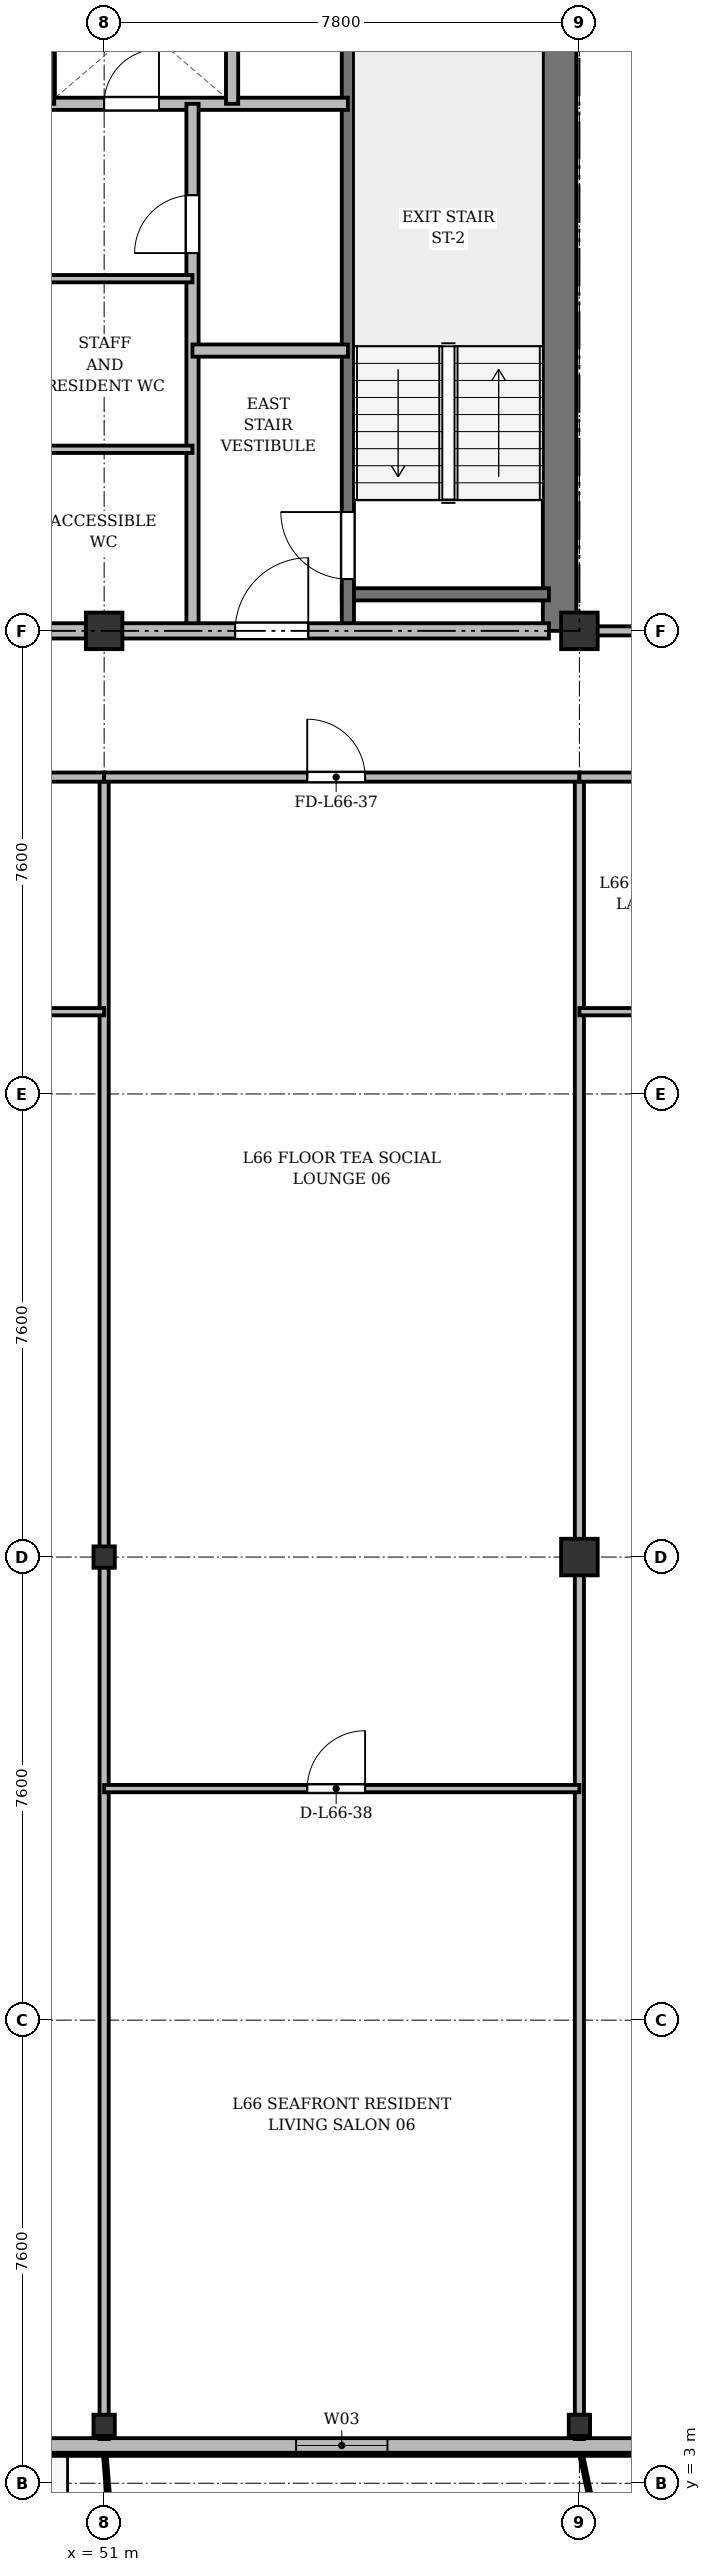
"""IFC4 building model, lengths in metres.
Left out: names, types, materials, properties, quantities, classifications, styles, units other than length and angle.
Written with IfcOpenShell. Run it as: python <this file> out.ifc"""

import sys

from ifc_helpers import new_model, si_unit, direction, frame, frame_2d, origin, origin_2d, place, context, subcontext, project, spatial, rectangle, i_section, extrude, source, transform, mapped, element, fill, save


model = new_model("IFC4")
c1 = context("Model", 3, precision=1e-05, world=origin(), true_north=direction((0.0, 1.0)))
c2 = subcontext(c1, "Body", "Model", "MODEL_VIEW")
j1 = project(units=[si_unit("LENGTHUNIT", "METRE"), si_unit("PLANEANGLEUNIT", "RADIAN")], contexts=[c1])
p1 = place(None, origin())
s1 = spatial("IfcSite", under=j1, at=p1, CompositionType="ELEMENT")
p2 = place(p1, origin())
s2 = spatial("IfcBuilding", under=s1, at=p2, CompositionType="ELEMENT")
p3 = place(p2, frame((0.0, 0.0, 255.9)))
s3 = spatial("IfcBuildingStorey", under=s2, at=p3, CompositionType="ELEMENT", Elevation=255.9)
m1 = source(origin(), c2, "Body", "SweptSolid", [
    extrude(i_section(OverallWidth=0.35, OverallDepth=0.35, WebThickness=0.018, FlangeThickness=0.028, at=origin_2d()), origin(), (0.0, 0.0, 1.0), 3.6),
])
for number, where, z_axis, x_axis in (
    (1, (51.0, 3.95, 0.0), (0.0, 0.0, 1.0), (1.0, 0.0, 0.0)),
    (2, (51.0, 18.2, 0.0), (0.0, 0.0, 1.0), (1.0, 0.0, 0.0)),
):
    element("IfcColumn", number, at=place(p3, frame(where, z_axis=z_axis, x_axis=x_axis)), inside=s3, PredefinedType="COLUMN", context=c2, shape_type="MappedRepresentation", body=[
        mapped(m1, transform((0.0, 0.0, 0.0), x_axis=(1.0, 0.0, 0.0), y_axis=(0.0, 1.0, 0.0), z_axis=(0.0, 0.0, 1.0), scale=1.0)),
    ])
m2 = source(origin(), c2, "Body", "SweptSolid", [
    extrude(rectangle(XDim=0.6, YDim=0.6, at=origin_2d()), origin(), (0.0, 0.0, 1.0), 3.6),
])
p4 = place(p3, frame((51.0, 33.4, 0.0), z_axis=(0.0, 0.0, 1.0), x_axis=(1.0, 0.0, 0.0)))
e3 = element("IfcColumn", 3, at=p4, inside=s3, PredefinedType="COLUMN", context=c2, shape_type="MappedRepresentation", body=[
    mapped(m2, transform((0.0, 0.0, 0.0), x_axis=(1.0, 0.0, 0.0), y_axis=(0.0, 1.0, 0.0), z_axis=(0.0, 0.0, 1.0), scale=1.0)),
])
p5 = place(p3, frame((58.8, 3.95, 0.0), z_axis=(0.0, 0.0, 1.0), x_axis=(1.0, 0.0, 0.0)))
e4 = element("IfcColumn", 4, at=p5, inside=s3, PredefinedType="COLUMN", context=c2, shape_type="MappedRepresentation", body=[
    mapped(m1, transform((0.0, 0.0, 0.0), x_axis=(1.0, 0.0, 0.0), y_axis=(0.0, 1.0, 0.0), z_axis=(0.0, 0.0, 1.0), scale=1.0)),
])
for number, where, z_axis, x_axis in (
    (5, (58.8, 18.2, 0.0), (0.0, 0.0, 1.0), (1.0, 0.0, 0.0)),
    (6, (58.8, 33.4, 0.0), (0.0, 0.0, 1.0), (1.0, 0.0, 0.0)),
):
    element("IfcColumn", number, at=place(p3, frame(where, z_axis=z_axis, x_axis=x_axis)), inside=s3, PredefinedType="COLUMN", context=c2, shape_type="MappedRepresentation", body=[
        mapped(m2, transform((0.0, 0.0, 0.0), x_axis=(1.0, 0.0, 0.0), y_axis=(0.0, 1.0, 0.0), z_axis=(0.0, 0.0, 1.0), scale=1.0)),
    ])
p6 = place(p3, frame((63.2, 3.62, 0.0), z_axis=(0.0, 0.0, 1.0), x_axis=(-1.0, 0.0, 0.0)))
e7 = element("IfcWall", 7, at=p6, inside=s3, PredefinedType="SOLIDWALL", context=c2, shape_type="SweptSolid", body=[
    extrude(rectangle(XDim=52.0, YDim=0.24, at=frame_2d((26.0, 0.0))), origin(), (0.0, 0.0, 1.0), 3.37),
])
p7 = place(p6, frame((1.145, 0.0, 0.9)))
e8 = element("IfcOpeningElement", 8, at=p7, cuts=e7, PredefinedType="OPENING", context=c2, shape_type="SweptSolid", body=[
    extrude(rectangle(XDim=2.2, YDim=1.8, at=frame_2d((1.1, 0.9))), frame((0.0, 0.13, 0.0), z_axis=(0.0, -1.0, 0.0), x_axis=(1.0, 0.0, 0.0)), (0.0, 0.0, 1.0), 0.26),
])
p8 = place(p6, frame((7.55, 0.0, 0.9)))
e9 = element("IfcOpeningElement", 9, at=p8, cuts=e7, PredefinedType="OPENING", context=c2, shape_type="SweptSolid", body=[
    extrude(rectangle(XDim=1.5, YDim=1.75, at=frame_2d((0.75, 0.875))), frame((0.0, 0.13, 0.0), z_axis=(0.0, -1.0, 0.0), x_axis=(1.0, 0.0, 0.0)), (0.0, 0.0, 1.0), 0.26),
])
p9 = place(p6, frame((14.017, 0.0, 0.0)))
e10 = element("IfcOpeningElement", 10, at=p9, cuts=e7, PredefinedType="OPENING", context=c2, shape_type="SweptSolid", body=[
    extrude(rectangle(XDim=1.2, YDim=2.2, at=frame_2d((0.6, 1.1))), frame((0.0, 0.13, 0.0), z_axis=(0.0, -1.0, 0.0), x_axis=(1.0, 0.0, 0.0)), (0.0, 0.0, 1.0), 0.26),
])
p10 = place(p6, frame((25.175, 0.0, 0.9)))
e11 = element("IfcOpeningElement", 11, at=p10, cuts=e7, PredefinedType="OPENING", context=c2, shape_type="SweptSolid", body=[
    extrude(rectangle(XDim=1.65, YDim=1.85, at=frame_2d((0.825, 0.925))), frame((0.0, 0.13, 0.0), z_axis=(0.0, -1.0, 0.0), x_axis=(1.0, 0.0, 0.0)), (0.0, 0.0, 1.0), 0.26),
])
p11 = place(p6, frame((35.3, 0.0, 0.9)))
e12 = element("IfcOpeningElement", 12, at=p11, cuts=e7, PredefinedType="OPENING", context=c2, shape_type="SweptSolid", body=[
    extrude(rectangle(XDim=1.8, YDim=1.8, at=frame_2d((0.9, 0.9))), frame((0.0, 0.13, 0.0), z_axis=(0.0, -1.0, 0.0), x_axis=(1.0, 0.0, 0.0)), (0.0, 0.0, 1.0), 0.26),
])
p12 = place(p6, frame((45.302, 0.0, 0.0)))
e13 = element("IfcOpeningElement", 13, at=p12, cuts=e7, PredefinedType="OPENING", context=c2, shape_type="SweptSolid", body=[
    extrude(rectangle(XDim=1.2, YDim=2.2, at=frame_2d((0.6, 1.1))), frame((0.0, 0.13, 0.0), z_axis=(0.0, -1.0, 0.0), x_axis=(1.0, 0.0, 0.0)), (0.0, 0.0, 1.0), 0.26),
])
p13 = place(p6, frame((49.005, 0.0, 0.9)))
e14 = element("IfcOpeningElement", 14, at=p13, cuts=e7, PredefinedType="OPENING", context=c2, shape_type="SweptSolid", body=[
    extrude(rectangle(XDim=1.5, YDim=1.75, at=frame_2d((0.75, 0.875))), frame((0.0, 0.13, 0.0), z_axis=(0.0, -1.0, 0.0), x_axis=(1.0, 0.0, 0.0)), (0.0, 0.0, 1.0), 0.26),
])
p14 = place(p3, frame((58.475, 33.4, 0.0), z_axis=(0.0, 0.0, 1.0), x_axis=(0.0, 1.0, 0.0)))
e15 = element("IfcWall", 15, at=p14, inside=s3, PredefinedType="SHEAR", context=c2, shape_type="SweptSolid", body=[
    extrude(rectangle(XDim=11.55, YDim=0.55, at=frame_2d((5.775, 0.0))), origin(), (0.0, 0.0, 1.0), 3.37),
])
p15 = place(p3, frame((54.9, 34.0, 0.0), z_axis=(0.0, 0.0, 1.0), x_axis=(1.0, 0.0, 0.0)))
e16 = element("IfcWall", 16, at=p15, inside=s3, PredefinedType="SHEAR", context=c2, shape_type="SweptSolid", body=[
    extrude(rectangle(XDim=3.4, YDim=0.2, at=frame_2d((1.7, 0.0))), origin(), (0.0, 0.0, 1.0), 3.37),
])
p16 = place(p3, frame((55.0, 33.4, 0.0), z_axis=(0.0, 0.0, 1.0), x_axis=(0.0, 1.0, 0.0)))
e17 = element("IfcWall", 17, at=p16, inside=s3, PredefinedType="SHEAR", context=c2, shape_type="SweptSolid", body=[
    extrude(rectangle(XDim=11.1, YDim=0.2, at=frame_2d((5.55, 0.0))), origin(), (0.0, 0.0, 1.0), 3.37),
])
p17 = place(p16, frame((0.85, 0.0, 0.0)))
e18 = element("IfcOpeningElement", 18, at=p17, cuts=e17, PredefinedType="OPENING", context=c2, shape_type="SweptSolid", body=[
    extrude(rectangle(XDim=1.1, YDim=2.15, at=frame_2d((0.55, 1.075))), frame((0.0, 0.11, 0.0), z_axis=(0.0, -1.0, 0.0), x_axis=(1.0, 0.0, 0.0)), (0.0, 0.0, 1.0), 0.22),
])
p18 = place(p3, frame((47.15, 42.05, 0.0), z_axis=(0.0, 0.0, 1.0), x_axis=(1.0, 0.0, 0.0)))
e19 = element("IfcWall", 19, at=p18, inside=s3, PredefinedType="SOLIDWALL", context=c2, shape_type="SweptSolid", body=[
    extrude(rectangle(XDim=7.85, YDim=0.2, at=frame_2d((3.925, 0.0))), origin(), (0.0, 0.0, 1.0), 2.87),
])
p19 = place(p18, frame((0.75, 0.0, 0.0)))
e20 = element("IfcOpeningElement", 20, at=p19, cuts=e19, PredefinedType="OPENING", context=c2, shape_type="SweptSolid", body=[
    extrude(rectangle(XDim=0.9, YDim=2.1, at=frame_2d((0.45, 1.05))), frame((0.0, 0.11, 0.0), z_axis=(0.0, -1.0, 0.0), x_axis=(1.0, 0.0, 0.0)), (0.0, 0.0, 1.0), 0.22),
])
p20 = place(p18, frame((3.85, 0.0, 0.0)))
e21 = element("IfcOpeningElement", 21, at=p20, cuts=e19, PredefinedType="OPENING", context=c2, shape_type="SweptSolid", body=[
    extrude(rectangle(XDim=0.9, YDim=2.1, at=frame_2d((0.45, 1.05))), frame((0.0, 0.11, 0.0), z_axis=(0.0, -1.0, 0.0), x_axis=(1.0, 0.0, 0.0)), (0.0, 0.0, 1.0), 0.22),
])
for number, where, z_axis, x_axis in (
    (22, (50.08, 42.05, 0.0), (0.0, 0.0, 1.0), (0.0, 1.0, 0.0)),
    (23, (53.1, 42.05, 0.0), (0.0, 0.0, 1.0), (0.0, 1.0, 0.0)),
):
    element("IfcWall", number, at=place(p3, frame(where, z_axis=z_axis, x_axis=x_axis)), inside=s3, PredefinedType="SOLIDWALL", context=c2, shape_type="SweptSolid", body=[
        extrude(rectangle(XDim=2.65, YDim=0.2, at=frame_2d((1.325, 0.0))), origin(), (0.0, 0.0, 1.0), 3.37),
    ])
p21 = place(p3, frame((52.45, 33.4, 0.0), z_axis=(0.0, 0.0, 1.0), x_axis=(0.0, 1.0, 0.0)))
e24 = element("IfcWall", 24, at=p21, inside=s3, PredefinedType="PARTITIONING", context=c2, shape_type="SweptSolid", body=[
    extrude(rectangle(XDim=8.65, YDim=0.2, at=frame_2d((4.325, 0.0))), origin(), (0.0, 0.0, 1.0), 2.92),
])
p22 = place(p21, frame((6.2, 0.0, 0.0)))
e25 = element("IfcOpeningElement", 25, at=p22, cuts=e24, PredefinedType="OPENING", context=c2, shape_type="SweptSolid", body=[
    extrude(rectangle(XDim=0.95, YDim=2.15, at=frame_2d((0.475, 1.075))), frame((0.0, 0.11, 0.0), z_axis=(0.0, -1.0, 0.0), x_axis=(1.0, 0.0, 0.0)), (0.0, 0.0, 1.0), 0.22),
])
p23 = place(p3, frame((52.45, 38.0, 0.0), z_axis=(0.0, 0.0, 1.0), x_axis=(1.0, 0.0, 0.0)))
e26 = element("IfcWall", 26, at=p23, inside=s3, PredefinedType="PARTITIONING", context=c2, shape_type="SweptSolid", body=[
    extrude(rectangle(XDim=2.55, YDim=0.2, at=frame_2d((1.275, 0.0))), origin(), (0.0, 0.0, 1.0), 3.37),
])
for number, where, z_axis, x_axis in (
    (27, (49.32, 36.38, 0.0), (0.0, 0.0, 1.0), (1.0, 0.0, 0.0)),
    (28, (49.32, 39.18, 0.0), (0.0, 0.0, 1.0), (1.0, 0.0, 0.0)),
):
    element("IfcWall", number, at=place(p3, frame(where, z_axis=z_axis, x_axis=x_axis)), inside=s3, PredefinedType="PARTITIONING", context=c2, shape_type="SweptSolid", body=[
        extrude(rectangle(XDim=3.13, YDim=0.12, at=frame_2d((1.565, 0.0))), origin(), (0.0, 0.0, 1.0), 2.87),
    ])
p24 = place(p3, frame((47.15, 33.4, 0.0), z_axis=(0.0, 0.0, 1.0), x_axis=(1.0, 0.0, 0.0)))
e29 = element("IfcWall", 29, at=p24, inside=s3, PredefinedType="PARTITIONING", context=c2, shape_type="SweptSolid", body=[
    extrude(rectangle(XDim=11.15, YDim=0.25, at=frame_2d((5.575, 0.0))), origin(), (0.0, 0.0, 1.0), 2.92),
])
p25 = place(p24, frame((0.7, 0.0, 0.0)))
e30 = element("IfcOpeningElement", 30, at=p25, cuts=e29, PredefinedType="OPENING", context=c2, shape_type="SweptSolid", body=[
    extrude(rectangle(XDim=0.95, YDim=2.15, at=frame_2d((0.475, 1.075))), frame((0.0, 0.135, 0.0), z_axis=(0.0, -1.0, 0.0), x_axis=(1.0, 0.0, 0.0)), (0.0, 0.0, 1.0), 0.27),
])
p26 = place(p24, frame((6.0, 0.0, 0.0)))
e31 = element("IfcOpeningElement", 31, at=p26, cuts=e29, PredefinedType="OPENING", context=c2, shape_type="SweptSolid", body=[
    extrude(rectangle(XDim=1.2, YDim=2.15, at=frame_2d((0.6, 1.075))), frame((0.0, 0.135, 0.0), z_axis=(0.0, -1.0, 0.0), x_axis=(1.0, 0.0, 0.0)), (0.0, 0.0, 1.0), 0.27),
])
p27 = place(p3, frame((58.8, 33.4, 0.0), z_axis=(0.0, 0.0, 1.0), x_axis=(1.0, 0.0, 0.0)))
e32 = element("IfcWall", 32, at=p27, inside=s3, PredefinedType="PARTITIONING", context=c2, shape_type="SweptSolid", body=[
    extrude(rectangle(XDim=7.15, YDim=0.15, at=frame_2d((3.575, 0.0))), origin(), (0.0, 0.0, 1.0), 2.92),
])
p28 = place(p27, frame((3.0, 0.0, 0.0)))
e33 = element("IfcOpeningElement", 33, at=p28, cuts=e32, PredefinedType="OPENING", context=c2, shape_type="SweptSolid", body=[
    extrude(rectangle(XDim=0.95, YDim=2.15, at=frame_2d((0.475, 1.075))), frame((0.0, 0.085, 0.0), z_axis=(0.0, -1.0, 0.0), x_axis=(1.0, 0.0, 0.0)), (0.0, 0.0, 1.0), 0.17),
])
for number, where, z_axis, x_axis in (
    (34, (51.0, 3.725, 0.0), (0.0, 0.0, 1.0), (0.0, 1.0, 0.0)),
    (35, (58.8, 3.725, 0.0), (0.0, 0.0, 1.0), (0.0, 1.0, 0.0)),
):
    element("IfcWall", number, at=place(p3, frame(where, z_axis=z_axis, x_axis=x_axis)), inside=s3, PredefinedType="PARTITIONING", context=c2, shape_type="SweptSolid", body=[
        extrude(rectangle(XDim=27.275, YDim=0.15, at=frame_2d((13.637, 0.0))), origin(), (0.0, 0.0, 1.0), 2.87),
    ])
p29 = place(p3, frame((43.8, 31.0, 0.0), z_axis=(0.0, 0.0, 1.0), x_axis=(1.0, 0.0, 0.0)))
e36 = element("IfcWall", 36, at=p29, inside=s3, PredefinedType="PARTITIONING", context=c2, shape_type="SweptSolid", body=[
    extrude(rectangle(XDim=7.2, YDim=0.15, at=frame_2d((3.6, 0.0))), origin(), (0.0, 0.0, 1.0), 2.87),
])
p30 = place(p29, frame((3.125, 0.0, 0.0)))
e37 = element("IfcOpeningElement", 37, at=p30, cuts=e36, PredefinedType="OPENING", context=c2, shape_type="SweptSolid", body=[
    extrude(rectangle(XDim=0.95, YDim=2.15, at=frame_2d((0.475, 1.075))), frame((0.0, 0.085, 0.0), z_axis=(0.0, -1.0, 0.0), x_axis=(1.0, 0.0, 0.0)), (0.0, 0.0, 1.0), 0.17),
])
p31 = place(p3, frame((43.8, 27.15, 0.0), z_axis=(0.0, 0.0, 1.0), x_axis=(1.0, 0.0, 0.0)))
e38 = element("IfcWall", 38, at=p31, inside=s3, PredefinedType="PARTITIONING", context=c2, shape_type="SweptSolid", body=[
    extrude(rectangle(XDim=7.2, YDim=0.12, at=frame_2d((3.6, 0.0))), origin(), (0.0, 0.0, 1.0), 2.87),
])
p32 = place(p31, frame((3.125, 0.0, 0.0)))
e39 = element("IfcOpeningElement", 39, at=p32, cuts=e38, PredefinedType="OPENING", context=c2, shape_type="SweptSolid", body=[
    extrude(rectangle(XDim=0.95, YDim=2.15, at=frame_2d((0.475, 1.075))), frame((0.0, 0.07, 0.0), z_axis=(0.0, -1.0, 0.0), x_axis=(1.0, 0.0, 0.0)), (0.0, 0.0, 1.0), 0.14),
])
p33 = place(p3, frame((51.0, 31.0, 0.0), z_axis=(0.0, 0.0, 1.0), x_axis=(1.0, 0.0, 0.0)))
e40 = element("IfcWall", 40, at=p33, inside=s3, PredefinedType="PARTITIONING", context=c2, shape_type="SweptSolid", body=[
    extrude(rectangle(XDim=7.8, YDim=0.15, at=frame_2d((3.9, 0.0))), origin(), (0.0, 0.0, 1.0), 2.87),
])
p34 = place(p33, frame((3.333, 0.0, 0.0)))
e41 = element("IfcOpeningElement", 41, at=p34, cuts=e40, PredefinedType="OPENING", context=c2, shape_type="SweptSolid", body=[
    extrude(rectangle(XDim=0.95, YDim=2.15, at=frame_2d((0.475, 1.075))), frame((0.0, 0.085, 0.0), z_axis=(0.0, -1.0, 0.0), x_axis=(1.0, 0.0, 0.0)), (0.0, 0.0, 1.0), 0.17),
])
p35 = place(p3, frame((51.0, 14.4, 0.0), z_axis=(0.0, 0.0, 1.0), x_axis=(1.0, 0.0, 0.0)))
e42 = element("IfcWall", 42, at=p35, inside=s3, PredefinedType="PARTITIONING", context=c2, shape_type="SweptSolid", body=[
    extrude(rectangle(XDim=7.8, YDim=0.12, at=frame_2d((3.9, 0.0))), origin(), (0.0, 0.0, 1.0), 2.87),
])
p36 = place(p35, frame((3.333, 0.0, 0.0)))
e43 = element("IfcOpeningElement", 43, at=p36, cuts=e42, PredefinedType="OPENING", context=c2, shape_type="SweptSolid", body=[
    extrude(rectangle(XDim=0.95, YDim=2.15, at=frame_2d((0.475, 1.075))), frame((0.0, 0.07, 0.0), z_axis=(0.0, -1.0, 0.0), x_axis=(1.0, 0.0, 0.0)), (0.0, 0.0, 1.0), 0.14),
])
p37 = place(p3, frame((58.8, 31.0, 0.0), z_axis=(0.0, 0.0, 1.0), x_axis=(1.0, 0.0, 0.0)))
e44 = element("IfcWall", 44, at=p37, inside=s3, PredefinedType="PARTITIONING", context=c2, shape_type="SweptSolid", body=[
    extrude(rectangle(XDim=7.175, YDim=0.15, at=frame_2d((3.587, 0.0))), origin(), (0.0, 0.0, 1.0), 2.87),
])
p38 = place(p37, frame((3.112, 0.0, 0.0)))
e45 = element("IfcOpeningElement", 45, at=p38, cuts=e44, PredefinedType="OPENING", context=c2, shape_type="SweptSolid", body=[
    extrude(rectangle(XDim=0.95, YDim=2.15, at=frame_2d((0.475, 1.075))), frame((0.0, 0.085, 0.0), z_axis=(0.0, -1.0, 0.0), x_axis=(1.0, 0.0, 0.0)), (0.0, 0.0, 1.0), 0.17),
])
p39 = place(p3, frame((58.8, 27.15, 0.0), z_axis=(0.0, 0.0, 1.0), x_axis=(1.0, 0.0, 0.0)))
e46 = element("IfcWall", 46, at=p39, inside=s3, PredefinedType="PARTITIONING", context=c2, shape_type="SweptSolid", body=[
    extrude(rectangle(XDim=7.175, YDim=0.12, at=frame_2d((3.587, 0.0))), origin(), (0.0, 0.0, 1.0), 2.87),
])
p40 = place(p39, frame((3.112, 0.0, 0.0)))
e47 = element("IfcOpeningElement", 47, at=p40, cuts=e46, PredefinedType="OPENING", context=c2, shape_type="SweptSolid", body=[
    extrude(rectangle(XDim=0.95, YDim=2.15, at=frame_2d((0.475, 1.075))), frame((0.0, 0.07, 0.0), z_axis=(0.0, -1.0, 0.0), x_axis=(1.0, 0.0, 0.0)), (0.0, 0.0, 1.0), 0.14),
])
m3 = source(origin(), c2, "Body", "SweptSolid", [
    extrude(rectangle(XDim=1.5, YDim=1.75, at=frame_2d((0.75, 0.875))), frame((0.0, 0.03, 0.0), z_axis=(0.0, -1.0, 0.0), x_axis=(1.0, 0.0, 0.0)), (0.0, 0.0, 1.0), 0.06),
])
p41 = place(p8, origin())
e48 = element("IfcWindow", 48, at=p41, inside=s3, PartitioningType="SINGLE_PANEL", PredefinedType="WINDOW", context=c2, shape_type="MappedRepresentation", body=[
    mapped(m3, transform((0.0, 0.0, 0.0), x_axis=(1.0, 0.0, 0.0), y_axis=(0.0, 1.0, 0.0), z_axis=(0.0, 0.0, 1.0), scale=1.0)),
])
fill(e9, e48)
m4 = source(origin(), c2, "Body", "SweptSolid", [
    extrude(rectangle(XDim=1.1, YDim=2.15, at=frame_2d((0.55, 1.075))), frame((0.0, 0.025, 0.0), z_axis=(0.0, -1.0, 0.0), x_axis=(1.0, 0.0, 0.0)), (0.0, 0.0, 1.0), 0.05),
])
p42 = place(p17, origin())
e49 = element("IfcDoor", 49, at=p42, inside=s3, OperationType="SINGLE_SWING_RIGHT", PredefinedType="DOOR", context=c2, shape_type="MappedRepresentation", body=[
    mapped(m4, transform((0.0, 0.0, 0.0), x_axis=(1.0, 0.0, 0.0), y_axis=(0.0, 1.0, 0.0), z_axis=(0.0, 0.0, 1.0), scale=1.0)),
])
fill(e18, e49)
m5 = source(origin(), c2, "Body", "SweptSolid", [
    extrude(rectangle(XDim=0.9, YDim=2.1, at=frame_2d((0.45, 1.05))), frame((0.0, 0.025, 0.0), z_axis=(0.0, -1.0, 0.0), x_axis=(1.0, 0.0, 0.0)), (0.0, 0.0, 1.0), 0.05),
])
p43 = place(p20, origin())
e50 = element("IfcDoor", 50, at=p43, inside=s3, OperationType="SINGLE_SWING_RIGHT", PredefinedType="DOOR", context=c2, shape_type="MappedRepresentation", body=[
    mapped(m5, transform((0.0, 0.0, 0.0), x_axis=(1.0, 0.0, 0.0), y_axis=(0.0, 1.0, 0.0), z_axis=(0.0, 0.0, 1.0), scale=1.0)),
])
fill(e21, e50)
m6 = source(origin(), c2, "Body", "SweptSolid", [
    extrude(rectangle(XDim=0.95, YDim=2.15, at=frame_2d((0.475, 1.075))), frame((0.0, 0.025, 0.0), z_axis=(0.0, -1.0, 0.0), x_axis=(1.0, 0.0, 0.0)), (0.0, 0.0, 1.0), 0.05),
])
p44 = place(p22, origin())
e51 = element("IfcDoor", 51, at=p44, inside=s3, OperationType="SINGLE_SWING_LEFT", PredefinedType="DOOR", context=c2, shape_type="MappedRepresentation", body=[
    mapped(m6, transform((0.0, 0.0, 0.0), x_axis=(1.0, 0.0, 0.0), y_axis=(0.0, 1.0, 0.0), z_axis=(0.0, 0.0, 1.0), scale=1.0)),
])
fill(e25, e51)
m7 = source(origin(), c2, "Body", "SweptSolid", [
    extrude(rectangle(XDim=1.2, YDim=2.15, at=frame_2d((0.6, 1.075))), frame((0.0, 0.025, 0.0), z_axis=(0.0, -1.0, 0.0), x_axis=(1.0, 0.0, 0.0)), (0.0, 0.0, 1.0), 0.05),
])
p45 = place(p26, origin())
e52 = element("IfcDoor", 52, at=p45, inside=s3, OperationType="SINGLE_SWING_RIGHT", PredefinedType="DOOR", context=c2, shape_type="MappedRepresentation", body=[
    mapped(m7, transform((0.0, 0.0, 0.0), x_axis=(1.0, 0.0, 0.0), y_axis=(0.0, 1.0, 0.0), z_axis=(0.0, 0.0, 1.0), scale=1.0)),
])
fill(e31, e52)
p46 = place(p34, origin())
e53 = element("IfcDoor", 53, at=p46, inside=s3, OperationType="SINGLE_SWING_LEFT", PredefinedType="DOOR", context=c2, shape_type="MappedRepresentation", body=[
    mapped(m6, transform((0.0, 0.0, 0.0), x_axis=(1.0, 0.0, 0.0), y_axis=(0.0, 1.0, 0.0), z_axis=(0.0, 0.0, 1.0), scale=1.0)),
])
fill(e41, e53)
p47 = place(p36, origin())
e54 = element("IfcDoor", 54, at=p47, inside=s3, OperationType="SINGLE_SWING_RIGHT", PredefinedType="DOOR", context=c2, shape_type="MappedRepresentation", body=[
    mapped(m6, transform((0.0, 0.0, 0.0), x_axis=(1.0, 0.0, 0.0), y_axis=(0.0, 1.0, 0.0), z_axis=(0.0, 0.0, 1.0), scale=1.0)),
])
fill(e43, e54)
save(model, sys.argv[1])
